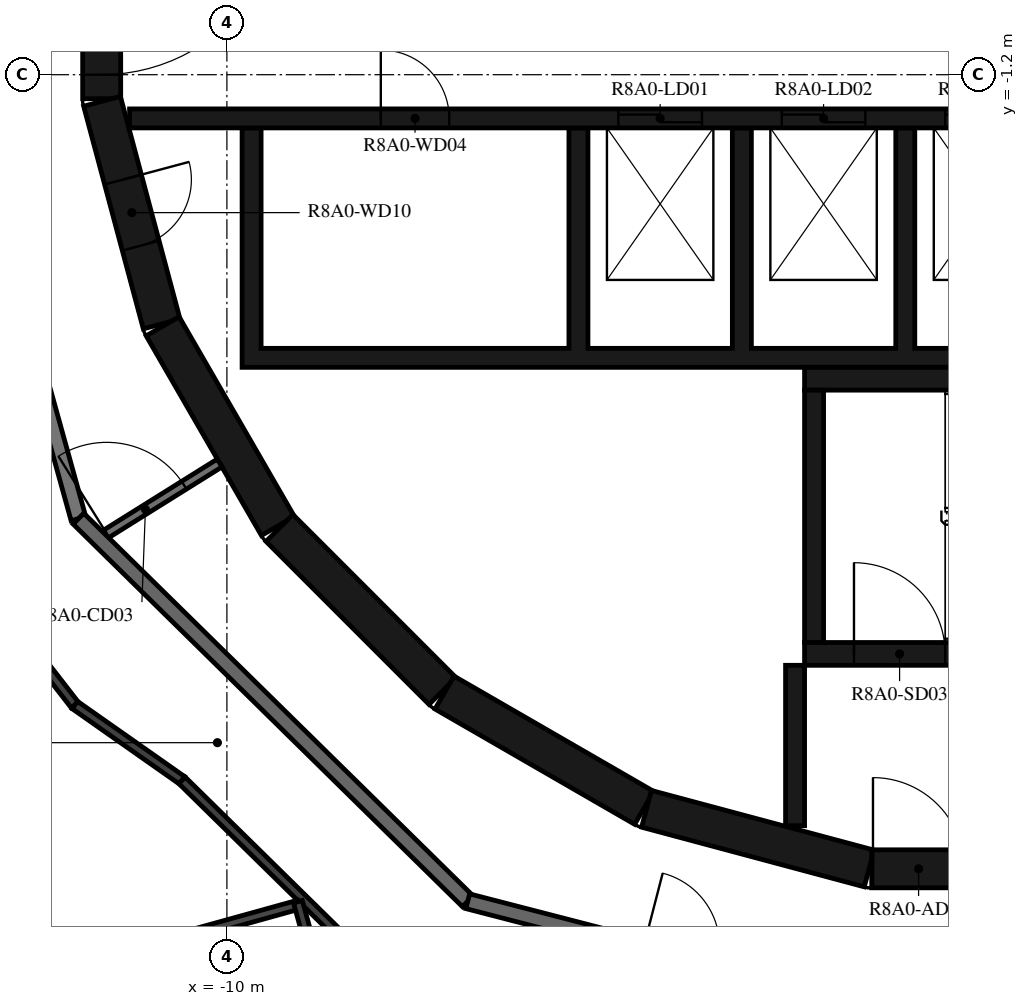
"""IFC4 building model, lengths in metres.
Left out: names, types, materials, properties, quantities, classifications, styles, units other than length and angle.
Written with IfcOpenShell. Run it as: python <this file> out.ifc"""

import sys

from ifc_helpers import new_model, si_unit, direction, frame, frame_2d, origin, place, context, subcontext, project, spatial, polyline, rectangle, outline, extrude, element, fill, save


model = new_model("IFC4")
c1 = context("Model", 3, precision=1e-05, world=origin(), true_north=direction((0.0, 1.0)))
c2 = subcontext(c1, "Body", "Model", "MODEL_VIEW")
j1 = project(units=[si_unit("LENGTHUNIT", "METRE"), si_unit("PLANEANGLEUNIT", "RADIAN")], contexts=[c1])
p1 = place(None, origin())
s1 = spatial("IfcSite", under=j1, at=p1, CompositionType="ELEMENT")
p2 = place(p1, origin())
s2 = spatial("IfcBuilding", under=s1, at=p2, CompositionType="ELEMENT")
p3 = place(p2, frame((0.0, 0.0, 305.2)))
s3 = spatial("IfcBuildingStorey", under=s2, at=p3, CompositionType="ELEMENT", Elevation=305.2)
p4 = place(p3, frame((-11.647, 1.516, 0.0), z_axis=(0.0, 0.0, 1.0), x_axis=(0.0, -1.0, 0.0)))
e1 = element("IfcWall", 1, at=p4, inside=s3, PredefinedType="SHEAR", context=c2, shape_type="SweptSolid", body=[
    extrude(rectangle(XDim=3.033, YDim=0.5, at=frame_2d((1.516, 0.0))), origin(), (0.0, 0.0, 1.0), 3.12),
])
p5 = place(p4, frame((0.316, 0.0, 0.0)))
e2 = element("IfcOpeningElement", 2, at=p5, cuts=e1, PredefinedType="OPENING", context=c2, shape_type="SweptSolid", body=[
    extrude(rectangle(XDim=2.4, YDim=2.1, at=frame_2d((1.2, 1.05))), frame((0.0, 0.26, 0.0), z_axis=(0.0, -1.0, 0.0), x_axis=(1.0, 0.0, 0.0)), (0.0, 0.0, 1.0), 0.52),
])
p6 = place(p3, frame((-11.643, -1.55, 0.0), z_axis=(0.0, 0.0, 1.0), x_axis=(0.258734743916, -0.965948410781, 0.0)))
e3 = element("IfcWall", 3, at=p6, inside=s3, PredefinedType="SHEAR", context=c2, shape_type="SweptSolid", body=[
    extrude(rectangle(XDim=3.033, YDim=0.5, at=frame_2d((1.516, 0.0))), origin(), (0.0, 0.0, 1.0), 3.12),
])
p7 = place(p6, frame((1.066, 0.0, 0.0)))
e4 = element("IfcOpeningElement", 4, at=p7, cuts=e3, PredefinedType="OPENING", context=c2, shape_type="SweptSolid", body=[
    extrude(rectangle(XDim=0.9, YDim=2.1, at=frame_2d((0.45, 1.05))), frame((0.0, 0.26, 0.0), z_axis=(0.0, -1.0, 0.0), x_axis=(1.0, 0.0, 0.0)), (0.0, 0.0, 1.0), 0.52),
])
p8 = place(p3, frame((-10.845, -4.51, 0.0), z_axis=(0.0, 0.0, 1.0), x_axis=(0.500087131594, -0.865975092491, 0.0)))
e5 = element("IfcWall", 5, at=p8, inside=s3, PredefinedType="SHEAR", context=c2, shape_type="SweptSolid", body=[
    extrude(rectangle(XDim=3.033, YDim=0.5, at=frame_2d((1.516, 0.0))), origin(), (0.0, 0.0, 1.0), 3.12),
])
p9 = place(p3, frame((-9.308, -7.164, 0.0), z_axis=(0.0, 0.0, 1.0), x_axis=(0.707106781187, -0.707106781187, 0.0)))
e6 = element("IfcWall", 6, at=p9, inside=s3, PredefinedType="SHEAR", context=c2, shape_type="SweptSolid", body=[
    extrude(rectangle(XDim=3.032, YDim=0.5, at=frame_2d((1.516, 0.0))), origin(), (0.0, 0.0, 1.0), 3.12),
])
for number, where, z_axis, x_axis in (
    (7, (-7.137, -9.329, 0.0), (0.0, 0.0, 1.0), (0.866, -0.5, 0.0)),
    (8, (-4.479, -10.858, 0.0), (0.0, 0.0, 1.0), (0.966, -0.259, 0.0)),
):
    element("IfcWall", number, at=place(p3, frame(where, z_axis=z_axis, x_axis=x_axis)), inside=s3, PredefinedType="SHEAR", context=c2, shape_type="SweptSolid", body=[
        extrude(rectangle(XDim=3.033, YDim=0.5, at=frame_2d((1.516, 0.0))), origin(), (0.0, 0.0, 1.0), 3.12),
    ])
p10 = place(p3, frame((-1.516, -11.647, 0.0), z_axis=(0.0, 0.0, 1.0), x_axis=(1.0, 0.0, 0.0)))
e9 = element("IfcWall", 9, at=p10, inside=s3, PredefinedType="SHEAR", context=c2, shape_type="SweptSolid", body=[
    extrude(rectangle(XDim=3.033, YDim=0.5, at=frame_2d((1.516, 0.0))), origin(), (0.0, 0.0, 1.0), 3.12),
])
p11 = place(p10, frame((0.016, 0.0, 0.0)))
e10 = element("IfcOpeningElement", 10, at=p11, cuts=e9, PredefinedType="OPENING", context=c2, shape_type="SweptSolid", body=[
    extrude(rectangle(XDim=1.2, YDim=2.1, at=frame_2d((0.6, 1.05))), frame((0.0, 0.26, 0.0), z_axis=(0.0, -1.0, 0.0), x_axis=(1.0, 0.0, 0.0)), (0.0, 0.0, 1.0), 0.52),
])
p12 = place(p3, frame((-2.275, -8.67, 0.0), z_axis=(0.0, 0.0, 1.0), x_axis=(0.0, 1.0, 0.0)))
e11 = element("IfcWall", 11, at=p12, inside=s3, PredefinedType="SHEAR", context=c2, shape_type="SweptSolid", body=[
    extrude(rectangle(XDim=3.32, YDim=0.25, at=frame_2d((1.66, 0.0))), origin(), (0.0, 0.0, 1.0), 3.12),
])
p13 = place(p3, frame((-2.4, -5.2, 0.0), z_axis=(0.0, 0.0, 1.0), x_axis=(1.0, 0.0, 0.0)))
e12 = element("IfcWall", 12, at=p13, inside=s3, PredefinedType="SHEAR", context=c2, shape_type="SweptSolid", body=[
    extrude(rectangle(XDim=7.05, YDim=0.3, at=frame_2d((3.525, 0.0))), origin(), (0.0, 0.0, 1.0), 3.12),
])
p14 = place(p3, frame((-2.4, -8.82, 0.0), z_axis=(0.0, 0.0, 1.0), x_axis=(1.0, 0.0, 0.0)))
e13 = element("IfcWall", 13, at=p14, inside=s3, PredefinedType="SHEAR", context=c2, shape_type="SweptSolid", body=[
    extrude(rectangle(XDim=2.5, YDim=0.3, at=frame_2d((1.25, 0.0))), origin(), (0.0, 0.0, 1.0), 3.12),
])
p15 = place(p14, frame((0.65, 0.0, 0.0)))
e14 = element("IfcOpeningElement", 14, at=p15, cuts=e13, PredefinedType="OPENING", context=c2, shape_type="SweptSolid", body=[
    extrude(rectangle(XDim=1.2, YDim=2.1, at=frame_2d((0.6, 1.05))), frame((0.0, 0.16, 0.0), z_axis=(0.0, -1.0, 0.0), x_axis=(1.0, 0.0, 0.0)), (0.0, 0.0, 1.0), 0.32),
])
p16 = place(p3, frame((-2.525, -8.97, 0.0), z_axis=(0.0, 0.0, 1.0), x_axis=(0.0, -1.0, 0.0)))
e15 = element("IfcWall", 15, at=p16, inside=s3, PredefinedType="SHEAR", context=c2, shape_type="SweptSolid", body=[
    extrude(rectangle(XDim=2.11, YDim=0.25, at=frame_2d((1.055, 0.0))), origin(), (0.0, 0.0, 1.0), 3.12),
])
p17 = place(p3, origin())
e16 = element("IfcWall", 16, at=p17, inside=s3, PredefinedType="SHEAR", context=c2, shape_type="SweptSolid", body=[
    extrude(outline(polyline([(9.8, -5.05), (9.8, -4.8), (9.8, -1.9), (9.55, -1.9), (9.55, -4.8), (7.65, -4.8), (7.65, -1.9), (7.4, -1.9), (7.4, -4.8), (5.5, -4.8), (5.5, -1.9), (5.25, -1.9), (5.25, -4.8), (3.35, -4.8), (3.35, -1.9), (3.1, -1.9), (3.1, -4.8), (1.2, -4.8), (1.2, -1.9), (0.95, -1.9), (0.95, -4.8), (-0.95, -4.8), (-0.95, -1.9), (-1.2, -1.9), (-1.2, -4.8), (-3.1, -4.8), (-3.1, -1.9), (-3.35, -1.9), (-3.35, -4.8), (-5.25, -4.8), (-5.25, -1.9), (-5.5, -1.9), (-5.5, -4.8), (-9.55, -4.8), (-9.55, -1.9), (-9.8, -1.9), (-9.8, -4.8), (-9.8, -5.05), (9.8, -5.05)])), origin(), (0.0, 0.0, 1.0), 3.12),
])
p18 = place(p3, frame((-11.28, -1.775, 0.0), z_axis=(0.0, 0.0, 1.0), x_axis=(1.0, 0.0, 0.0)))
e17 = element("IfcWall", 17, at=p18, inside=s3, PredefinedType="SHEAR", context=c2, shape_type="SweptSolid", body=[
    extrude(rectangle(XDim=14.38, YDim=0.25, at=frame_2d((7.19, 0.0))), origin(), (0.0, 0.0, 1.0), 3.12),
])
p19 = place(p18, frame((6.43, 0.0, 0.0)))
e18 = element("IfcOpeningElement", 18, at=p19, cuts=e17, PredefinedType="OPENING", context=c2, shape_type="SweptSolid", body=[
    extrude(rectangle(XDim=1.1, YDim=2.1, at=frame_2d((0.55, 1.05))), frame((0.0, 0.135, 0.0), z_axis=(0.0, -1.0, 0.0), x_axis=(1.0, 0.0, 0.0)), (0.0, 0.0, 1.0), 0.27),
])
p20 = place(p18, frame((8.58, 0.0, 0.0)))
e19 = element("IfcOpeningElement", 19, at=p20, cuts=e17, PredefinedType="OPENING", context=c2, shape_type="SweptSolid", body=[
    extrude(rectangle(XDim=1.1, YDim=2.1, at=frame_2d((0.55, 1.05))), frame((0.0, 0.135, 0.0), z_axis=(0.0, -1.0, 0.0), x_axis=(1.0, 0.0, 0.0)), (0.0, 0.0, 1.0), 0.27),
])
p21 = place(p18, frame((10.73, 0.0, 0.0)))
e20 = element("IfcOpeningElement", 20, at=p21, cuts=e17, PredefinedType="OPENING", context=c2, shape_type="SweptSolid", body=[
    extrude(rectangle(XDim=1.1, YDim=2.1, at=frame_2d((0.55, 1.05))), frame((0.0, 0.135, 0.0), z_axis=(0.0, -1.0, 0.0), x_axis=(1.0, 0.0, 0.0)), (0.0, 0.0, 1.0), 0.27),
])
p22 = place(p18, frame((3.305, 0.0, 0.0)))
e21 = element("IfcOpeningElement", 21, at=p22, cuts=e17, PredefinedType="OPENING", context=c2, shape_type="SweptSolid", body=[
    extrude(rectangle(XDim=0.9, YDim=2.1, at=frame_2d((0.45, 1.05))), frame((0.0, 0.135, 0.0), z_axis=(0.0, -1.0, 0.0), x_axis=(1.0, 0.0, 0.0)), (0.0, 0.0, 1.0), 0.27),
])
p23 = place(p18, frame((12.98, 0.0, 0.0)))
e22 = element("IfcOpeningElement", 22, at=p23, cuts=e17, PredefinedType="OPENING", context=c2, shape_type="SweptSolid", body=[
    extrude(rectangle(XDim=0.9, YDim=2.1, at=frame_2d((0.45, 1.05))), frame((0.0, 0.135, 0.0), z_axis=(0.0, -1.0, 0.0), x_axis=(1.0, 0.0, 0.0)), (0.0, 0.0, 1.0), 0.27),
])
p24 = place(p3, frame((-11.687, -7.303, 0.0), z_axis=(0.0, 0.0, 1.0), x_axis=(0.848064094072, 0.529893661357, 0.0)))
e23 = element("IfcWall", 23, at=p24, inside=s3, PredefinedType="PARTITIONING", context=c2, shape_type="SweptSolid", body=[
    extrude(rectangle(XDim=1.876, YDim=0.12, at=frame_2d((0.938, 0.0))), origin(), (0.0, 0.0, 1.0), 3.12),
])
p25 = place(p24, frame((0.125, 0.0, 0.0)))
e24 = element("IfcOpeningElement", 24, at=p25, cuts=e23, PredefinedType="OPENING", context=c2, shape_type="SweptSolid", body=[
    extrude(rectangle(XDim=1.2, YDim=2.1, at=frame_2d((0.6, 1.05))), frame((0.0, 0.07, 0.0), z_axis=(0.0, -1.0, 0.0), x_axis=(1.0, 0.0, 0.0)), (0.0, 0.0, 1.0), 0.14),
])
p26 = place(p3, frame((-13.872, -0.121, 0.0), z_axis=(0.0, 0.0, 1.0), x_axis=(0.267254575108, -0.963625960674, 0.0)))
e25 = element("IfcWall", 25, at=p26, inside=s3, PredefinedType="STANDARD", context=c2, shape_type="SweptSolid", body=[
    extrude(rectangle(XDim=7.181, YDim=0.2, at=frame_2d((3.591, 0.0))), origin(), (0.0, 0.0, 1.0), 3.12),
])
p27 = place(p3, frame((-11.953, -7.041, 0.0), z_axis=(0.0, 0.0, 1.0), x_axis=(0.713250549143, -0.70090916255, 0.0)))
e26 = element("IfcWall", 26, at=p27, inside=s3, PredefinedType="STANDARD", context=c2, shape_type="SweptSolid", body=[
    extrude(rectangle(XDim=7.181, YDim=0.2, at=frame_2d((3.59, 0.0))), origin(), (0.0, 0.0, 1.0), 3.12),
])
p28 = place(p3, frame((-6.831, -12.074, 0.0), z_axis=(0.0, 0.0, 1.0), x_axis=(0.968144780225, -0.250391063186, 0.0)))
e27 = element("IfcWall", 27, at=p28, inside=s3, PredefinedType="STANDARD", context=c2, shape_type="SweptSolid", body=[
    extrude(rectangle(XDim=7.181, YDim=0.2, at=frame_2d((3.591, 0.0))), origin(), (0.0, 0.0, 1.0), 3.12),
])
p29 = place(p28, frame((2.39, 0.0, 0.0)))
e28 = element("IfcOpeningElement", 28, at=p29, cuts=e27, PredefinedType="OPENING", context=c2, shape_type="SweptSolid", body=[
    extrude(rectangle(XDim=1.0, YDim=2.1, at=frame_2d((0.5, 1.05))), frame((0.0, 0.11, 0.0), z_axis=(0.0, -1.0, 0.0), x_axis=(1.0, 0.0, 0.0)), (0.0, 0.0, 1.0), 0.22),
])
p30 = place(p28, frame((5.69, 0.0, 0.0)))
e29 = element("IfcOpeningElement", 29, at=p30, cuts=e27, PredefinedType="OPENING", context=c2, shape_type="SweptSolid", body=[
    extrude(rectangle(XDim=1.0, YDim=2.1, at=frame_2d((0.5, 1.05))), frame((0.0, 0.11, 0.0), z_axis=(0.0, -1.0, 0.0), x_axis=(1.0, 0.0, 0.0)), (0.0, 0.0, 1.0), 0.22),
])
p31 = place(p3, frame((-13.291, -7.829, 0.0), z_axis=(0.0, 0.0, 1.0), x_axis=(0.613017069232, -0.790069663277, 0.0)))
e30 = element("IfcWall", 30, at=p31, inside=s3, PredefinedType="PARTITIONING", context=c2, shape_type="SweptSolid", body=[
    extrude(rectangle(XDim=2.106, YDim=0.12, at=frame_2d((1.053, 0.0))), origin(), (0.0, 0.0, 1.0), 3.12),
])
p32 = place(p3, frame((-12.0, -9.493, 0.0), z_axis=(0.0, 0.0, 1.0), x_axis=(0.818312362022, -0.57477376259, 0.0)))
e31 = element("IfcWall", 31, at=p32, inside=s3, PredefinedType="PARTITIONING", context=c2, shape_type="SweptSolid", body=[
    extrude(rectangle(XDim=1.723, YDim=0.12, at=frame_2d((0.862, 0.0))), origin(), (0.0, 0.0, 1.0), 3.12),
])
p33 = place(p3, frame((-10.59, -10.483, 0.0), z_axis=(0.0, 0.0, 1.0), x_axis=(0.713244109461, -0.70091571556, 0.0)))
e32 = element("IfcWall", 32, at=p33, inside=s3, PredefinedType="PARTITIONING", context=c2, shape_type="SweptSolid", body=[
    extrude(rectangle(XDim=4.198, YDim=0.12, at=frame_2d((2.099, 0.0))), origin(), (0.0, 0.0, 1.0), 3.12),
])
p34 = place(p3, frame((-14.066, -13.508, 0.0), z_axis=(0.0, 0.0, 1.0), x_axis=(0.963643585504, 0.267191018032, 0.0)))
e33 = element("IfcWall", 33, at=p34, inside=s3, PredefinedType="PARTITIONING", context=c2, shape_type="SweptSolid", body=[
    extrude(rectangle(XDim=5.2, YDim=0.12, at=frame_2d((2.6, 0.0))), origin(), (0.0, 0.0, 1.0), 2.73),
])
p35 = place(p3, frame((-7.368, -18.202, 0.0), z_axis=(0.0, 0.0, 1.0), x_axis=(-0.26723158658, 0.963632336077, 0.0)))
e34 = element("IfcWall", 34, at=p35, inside=s3, PredefinedType="PARTITIONING", context=c2, shape_type="SweptSolid", body=[
    extrude(rectangle(XDim=6.353, YDim=0.12, at=frame_2d((3.177, 0.0))), origin(), (0.0, 0.0, 1.0), 3.12),
])
p36 = place(p35, frame((2.956, 0.0, 0.0)))
e35 = element("IfcOpeningElement", 35, at=p36, cuts=e34, PredefinedType="OPENING", context=c2, shape_type="SweptSolid", body=[
    extrude(rectangle(XDim=0.9, YDim=2.1, at=frame_2d((0.45, 1.05))), frame((0.0, 0.07, 0.0), z_axis=(0.0, -1.0, 0.0), x_axis=(1.0, 0.0, 0.0)), (0.0, 0.0, 1.0), 0.14),
])
p37 = place(p15, origin())
e36 = element("IfcDoor", 36, at=p37, inside=s3, OperationType="SINGLE_SWING_LEFT", PredefinedType="DOOR", context=c2, shape_type="SweptSolid", body=[
    extrude(rectangle(XDim=1.2, YDim=2.1, at=frame_2d((0.6, 1.05))), frame((0.0, 0.025, 0.0), z_axis=(0.0, -1.0, 0.0), x_axis=(1.0, 0.0, 0.0)), (0.0, 0.0, 1.0), 0.05),
])
fill(e14, e36)
p38 = place(p11, origin())
e37 = element("IfcDoor", 37, at=p38, inside=s3, OperationType="SINGLE_SWING_RIGHT", PredefinedType="DOOR", context=c2, shape_type="SweptSolid", body=[
    extrude(rectangle(XDim=1.2, YDim=2.1, at=frame_2d((0.6, 1.05))), frame((0.0, 0.025, 0.0), z_axis=(0.0, -1.0, 0.0), x_axis=(1.0, 0.0, 0.0)), (0.0, 0.0, 1.0), 0.05),
])
fill(e10, e37)
p39 = place(p5, origin())
e38 = element("IfcDoor", 38, at=p39, inside=s3, OperationType="DOUBLE_DOOR_SINGLE_SWING", PredefinedType="DOOR", context=c2, shape_type="SweptSolid", body=[
    extrude(rectangle(XDim=2.4, YDim=2.1, at=frame_2d((1.2, 1.05))), frame((0.0, 0.025, 0.0), z_axis=(0.0, -1.0, 0.0), x_axis=(1.0, 0.0, 0.0)), (0.0, 0.0, 1.0), 0.05),
])
fill(e2, e38)
p40 = place(p19, origin())
e39 = element("IfcDoor", 39, at=p40, inside=s3, OperationType="DOUBLE_DOOR_SLIDING", PredefinedType="DOOR", context=c2, shape_type="SweptSolid", body=[
    extrude(rectangle(XDim=1.1, YDim=2.1, at=frame_2d((0.55, 1.05))), frame((0.0, 0.025, 0.0), z_axis=(0.0, -1.0, 0.0), x_axis=(1.0, 0.0, 0.0)), (0.0, 0.0, 1.0), 0.05),
])
fill(e18, e39)
p41 = place(p20, origin())
e40 = element("IfcDoor", 40, at=p41, inside=s3, OperationType="DOUBLE_DOOR_SLIDING", PredefinedType="DOOR", context=c2, shape_type="SweptSolid", body=[
    extrude(rectangle(XDim=1.1, YDim=2.1, at=frame_2d((0.55, 1.05))), frame((0.0, 0.025, 0.0), z_axis=(0.0, -1.0, 0.0), x_axis=(1.0, 0.0, 0.0)), (0.0, 0.0, 1.0), 0.05),
])
fill(e19, e40)
p42 = place(p21, origin())
e41 = element("IfcDoor", 41, at=p42, inside=s3, OperationType="DOUBLE_DOOR_SLIDING", PredefinedType="DOOR", context=c2, shape_type="SweptSolid", body=[
    extrude(rectangle(XDim=1.1, YDim=2.1, at=frame_2d((0.55, 1.05))), frame((0.0, 0.025, 0.0), z_axis=(0.0, -1.0, 0.0), x_axis=(1.0, 0.0, 0.0)), (0.0, 0.0, 1.0), 0.05),
])
fill(e20, e41)
p43 = place(p22, origin())
e42 = element("IfcDoor", 42, at=p43, inside=s3, OperationType="SINGLE_SWING_RIGHT", PredefinedType="DOOR", context=c2, shape_type="SweptSolid", body=[
    extrude(rectangle(XDim=0.9, YDim=2.1, at=frame_2d((0.45, 1.05))), frame((0.0, 0.025, 0.0), z_axis=(0.0, -1.0, 0.0), x_axis=(1.0, 0.0, 0.0)), (0.0, 0.0, 1.0), 0.05),
])
fill(e21, e42)
p44 = place(p7, origin())
e43 = element("IfcDoor", 43, at=p44, inside=s3, OperationType="SINGLE_SWING_RIGHT", PredefinedType="DOOR", context=c2, shape_type="SweptSolid", body=[
    extrude(rectangle(XDim=0.9, YDim=2.1, at=frame_2d((0.45, 1.05))), frame((0.0, 0.025, 0.0), z_axis=(0.0, -1.0, 0.0), x_axis=(1.0, 0.0, 0.0)), (0.0, 0.0, 1.0), 0.05),
])
fill(e4, e43)
p45 = place(p25, origin())
e44 = element("IfcDoor", 44, at=p45, inside=s3, OperationType="DOUBLE_DOOR_SINGLE_SWING", PredefinedType="DOOR", context=c2, shape_type="SweptSolid", body=[
    extrude(rectangle(XDim=1.2, YDim=2.1, at=frame_2d((0.6, 1.05))), frame((0.0, 0.025, 0.0), z_axis=(0.0, -1.0, 0.0), x_axis=(1.0, 0.0, 0.0)), (0.0, 0.0, 1.0), 0.05),
])
fill(e24, e44)
save(model, sys.argv[1])
